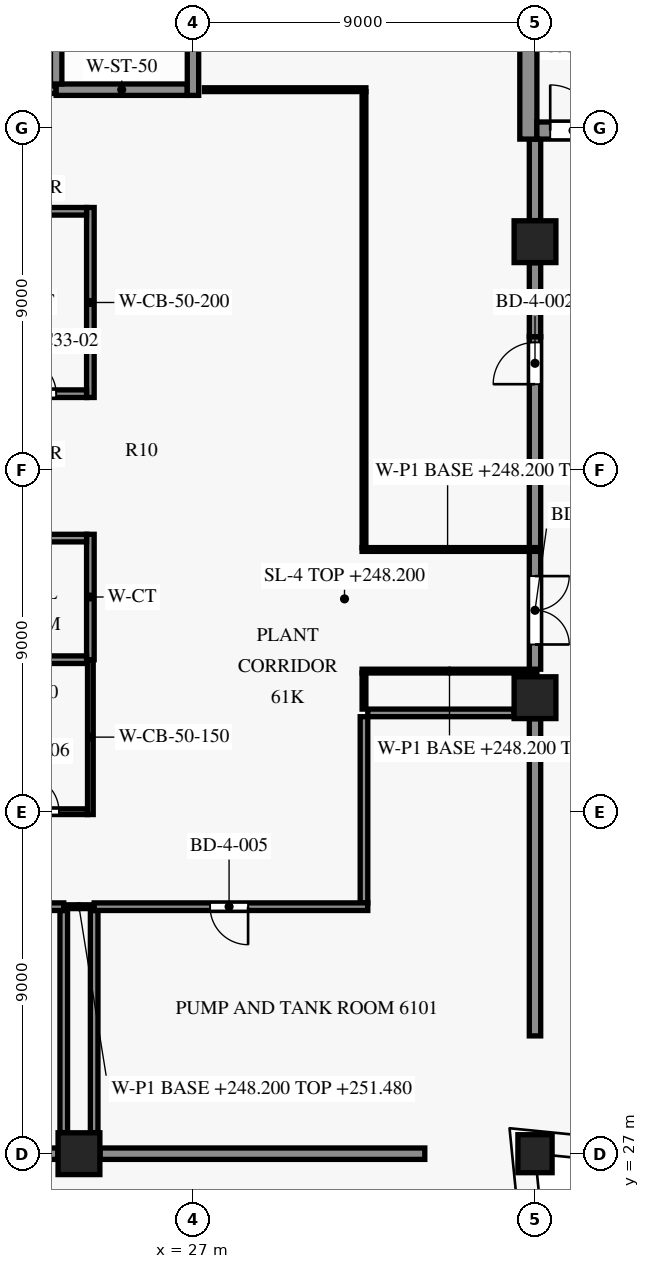
"""IFC4 building model, lengths in metres.
Left out: names, types, materials, properties, quantities, classifications, styles, units other than length and angle.
Written with IfcOpenShell. Run it as: python <this file> out.ifc"""

import sys

from ifc_helpers import new_model, si_unit, direction, frame, frame_2d, origin, origin_2d, place, context, subcontext, project, spatial, rectangle, extrude, element, fill, save


model = new_model("IFC4")
c1 = context("Model", 3, precision=1e-05, world=origin(), true_north=direction((0.0, 1.0)))
c2 = subcontext(c1, "Body", "Model", "MODEL_VIEW")
j1 = project(units=[si_unit("LENGTHUNIT", "METRE"), si_unit("PLANEANGLEUNIT", "RADIAN")], contexts=[c1])
p1 = place(None, origin())
s1 = spatial("IfcSite", under=j1, at=p1, CompositionType="ELEMENT")
p2 = place(p1, origin())
s2 = spatial("IfcBuilding", under=s1, at=p2, CompositionType="ELEMENT")
p3 = place(p2, frame((0.0, 0.0, 248.2)))
s3 = spatial("IfcBuildingStorey", under=s2, at=p3, CompositionType="ELEMENT", Elevation=248.2)
p4 = place(p3, frame((36.0, 27.0, 0.0), z_axis=(0.0, 0.0, 1.0), x_axis=(-0.0995038382, 0.995037178292, 0.0)))
e1 = element("IfcColumn", 1, at=p4, inside=s3, PredefinedType="COLUMN", context=c2, shape_type="SweptSolid", body=[
    extrude(rectangle(XDim=0.9, YDim=1.0, at=origin_2d()), origin(), (0.0, 0.0, 1.0), 4.2),
])
for number, where, z_axis, x_axis in (
    (2, (24.0, 27.0, 0.0), (0.0, 0.0, 1.0), (1.0, 0.0, 0.0)),
    (3, (36.0, 39.0, 0.0), (0.0, 0.0, 1.0), (1.0, 0.0, 0.0)),
    (4, (36.0, 51.0, 0.0), (0.0, 0.0, 1.0), (1.0, 0.0, 0.0)),
):
    element("IfcColumn", number, at=place(p3, frame(where, z_axis=z_axis, x_axis=x_axis)), inside=s3, PredefinedType="COLUMN", context=c2, shape_type="SweptSolid", body=[
        extrude(rectangle(XDim=1.1, YDim=1.1, at=origin_2d()), origin(), (0.0, 0.0, 1.0), 4.2),
    ])
p5 = place(p3, frame((12.4, 36.0, 0.0), z_axis=(0.0, 0.0, 1.0), x_axis=(1.0, 0.0, 0.0)))
e5 = element("IfcWall", 5, at=p5, inside=s3, PredefinedType="SHEAR", context=c2, shape_type="SweptSolid", body=[
    extrude(rectangle(XDim=11.825, YDim=0.15, at=frame_2d((5.913, 0.0))), origin(), (0.0, 0.0, 1.0), 3.9),
])
p6 = place(p5, frame((1.05, 0.0, 0.0)))
e6 = element("IfcOpeningElement", 6, at=p6, cuts=e5, PredefinedType="OPENING", context=c2, shape_type="SweptSolid", body=[
    extrude(rectangle(XDim=0.9, YDim=2.1, at=frame_2d((0.45, 1.05))), frame((0.0, 0.085, 0.0), z_axis=(0.0, -1.0, 0.0), x_axis=(1.0, 0.0, 0.0)), (0.0, 0.0, 1.0), 0.17),
])
p7 = place(p5, frame((4.15, 0.0, 0.0)))
e7 = element("IfcOpeningElement", 7, at=p7, cuts=e5, PredefinedType="OPENING", context=c2, shape_type="SweptSolid", body=[
    extrude(rectangle(XDim=1.0, YDim=2.1, at=frame_2d((0.5, 1.05))), frame((0.0, 0.085, 0.0), z_axis=(0.0, -1.0, 0.0), x_axis=(1.0, 0.0, 0.0)), (0.0, 0.0, 1.0), 0.17),
])
p8 = place(p5, frame((7.35, 0.0, 0.0)))
e8 = element("IfcOpeningElement", 8, at=p8, cuts=e5, PredefinedType="OPENING", context=c2, shape_type="SweptSolid", body=[
    extrude(rectangle(XDim=0.9, YDim=2.1, at=frame_2d((0.45, 1.05))), frame((0.0, 0.085, 0.0), z_axis=(0.0, -1.0, 0.0), x_axis=(1.0, 0.0, 0.0)), (0.0, 0.0, 1.0), 0.17),
])
p9 = place(p5, frame((10.125, 0.0, 0.0)))
e9 = element("IfcOpeningElement", 9, at=p9, cuts=e5, PredefinedType="OPENING", context=c2, shape_type="SweptSolid", body=[
    extrude(rectangle(XDim=0.95, YDim=2.1, at=frame_2d((0.475, 1.05))), frame((0.0, 0.085, 0.0), z_axis=(0.0, -1.0, 0.0), x_axis=(1.0, 0.0, 0.0)), (0.0, 0.0, 1.0), 0.17),
])
p10 = place(p3, frame((8.1, 40.0, 0.0), z_axis=(0.0, 0.0, 1.0), x_axis=(1.0, 0.0, 0.0)))
e10 = element("IfcWall", 10, at=p10, inside=s3, PredefinedType="PARTITIONING", context=c2, shape_type="SweptSolid", body=[
    extrude(rectangle(XDim=16.1, YDim=0.2, at=frame_2d((8.05, 0.0))), origin(), (0.0, 0.0, 1.0), 3.9),
])
p11 = place(p3, frame((8.1, 43.2, 0.0), z_axis=(0.0, 0.0, 1.0), x_axis=(1.0, 0.0, 0.0)))
e11 = element("IfcWall", 11, at=p11, inside=s3, PredefinedType="PARTITIONING", context=c2, shape_type="SweptSolid", body=[
    extrude(rectangle(XDim=16.1, YDim=0.2, at=frame_2d((8.05, 0.0))), origin(), (0.0, 0.0, 1.0), 3.9),
])
p12 = place(p11, frame((1.575, 0.0, 0.0)))
e12 = element("IfcOpeningElement", 12, at=p12, cuts=e11, PredefinedType="OPENING", context=c2, shape_type="SweptSolid", body=[
    extrude(rectangle(XDim=0.9, YDim=2.1, at=frame_2d((0.45, 1.05))), frame((0.0, 0.11, 0.0), z_axis=(0.0, -1.0, 0.0), x_axis=(1.0, 0.0, 0.0)), (0.0, 0.0, 1.0), 0.22),
])
p13 = place(p11, frame((9.675, 0.0, 0.0)))
e13 = element("IfcOpeningElement", 13, at=p13, cuts=e11, PredefinedType="OPENING", context=c2, shape_type="SweptSolid", body=[
    extrude(rectangle(XDim=0.9, YDim=2.1, at=frame_2d((0.45, 1.05))), frame((0.0, 0.11, 0.0), z_axis=(0.0, -1.0, 0.0), x_axis=(1.0, 0.0, 0.0)), (0.0, 0.0, 1.0), 0.22),
])
p14 = place(p3, frame((21.6, 47.0, 0.0), z_axis=(0.0, 0.0, 1.0), x_axis=(1.0, 0.0, 0.0)))
e14 = element("IfcWall", 14, at=p14, inside=s3, PredefinedType="PARTITIONING", context=c2, shape_type="SweptSolid", body=[
    extrude(rectangle(XDim=2.6, YDim=0.2, at=frame_2d((1.3, 0.0))), origin(), (0.0, 0.0, 1.0), 3.9),
])
p15 = place(p14, frame((0.9, 0.0, 0.0)))
e15 = element("IfcOpeningElement", 15, at=p15, cuts=e14, PredefinedType="OPENING", context=c2, shape_type="SweptSolid", body=[
    extrude(rectangle(XDim=0.9, YDim=2.1, at=frame_2d((0.45, 1.05))), frame((0.0, 0.11, 0.0), z_axis=(0.0, -1.0, 0.0), x_axis=(1.0, 0.0, 0.0)), (0.0, 0.0, 1.0), 0.22),
])
p16 = place(p3, frame((21.6, 51.8, 0.0), z_axis=(0.0, 0.0, 1.0), x_axis=(1.0, 0.0, 0.0)))
e16 = element("IfcWall", 16, at=p16, inside=s3, PredefinedType="PARTITIONING", context=c2, shape_type="SweptSolid", body=[
    extrude(rectangle(XDim=2.6, YDim=0.2, at=frame_2d((1.3, 0.0))), origin(), (0.0, 0.0, 1.0), 3.9),
])
p17 = place(p3, frame((36.05, 53.925, 0.0), z_axis=(0.0, 0.0, 1.0), x_axis=(1.0, 0.0, 0.0)))
e17 = element("IfcWall", 17, at=p17, inside=s3, PredefinedType="SHEAR", context=c2, shape_type="SweptSolid", body=[
    extrude(rectangle(XDim=7.7, YDim=0.45, at=frame_2d((3.85, 0.0))), origin(), (0.0, 0.0, 1.0), 3.9),
])
p18 = place(p17, frame((0.35, 0.0, 0.0)))
e18 = element("IfcOpeningElement", 18, at=p18, cuts=e17, PredefinedType="OPENING", context=c2, shape_type="SweptSolid", body=[
    extrude(rectangle(XDim=1.2, YDim=2.2, at=frame_2d((0.6, 1.1))), frame((0.0, 0.235, 0.0), z_axis=(0.0, -1.0, 0.0), x_axis=(1.0, 0.0, 0.0)), (0.0, 0.0, 1.0), 0.47),
])
p19 = place(p3, frame((17.3, 55.0, 0.0), z_axis=(0.0, 0.0, 1.0), x_axis=(1.0, 0.0, 0.0)))
e19 = element("IfcWall", 19, at=p19, inside=s3, PredefinedType="PARTITIONING", context=c2, shape_type="SweptSolid", body=[
    extrude(rectangle(XDim=6.1, YDim=0.2, at=frame_2d((3.05, 0.0))), origin(), (0.0, 0.0, 1.0), 3.9),
])
p20 = place(p19, frame((2.55, 0.0, 0.0)))
e20 = element("IfcOpeningElement", 20, at=p20, cuts=e19, PredefinedType="OPENING", context=c2, shape_type="SweptSolid", body=[
    extrude(rectangle(XDim=1.0, YDim=2.1, at=frame_2d((0.5, 1.05))), frame((0.0, 0.11, 0.0), z_axis=(0.0, -1.0, 0.0), x_axis=(1.0, 0.0, 0.0)), (0.0, 0.0, 1.0), 0.22),
])
p21 = place(p3, frame((23.4, 55.0, 0.0), z_axis=(0.0, 0.0, 1.0), x_axis=(1.0, 0.0, 0.0)))
e21 = element("IfcWall", 21, at=p21, inside=s3, PredefinedType="SHEAR", context=c2, shape_type="SweptSolid", body=[
    extrude(rectangle(XDim=3.45, YDim=0.3, at=frame_2d((1.725, 0.0))), origin(), (0.0, 0.0, 1.0), 3.9),
])
p22 = place(p3, frame((23.4, 55.15, 0.0), z_axis=(0.0, 0.0, 1.0), x_axis=(0.0, 1.0, 0.0)))
e22 = element("IfcWall", 22, at=p22, inside=s3, PredefinedType="SHEAR", context=c2, shape_type="SweptSolid", body=[
    extrude(rectangle(XDim=8.0, YDim=0.3, at=frame_2d((4.0, 0.0))), origin(), (0.0, 0.0, 1.0), 3.9),
])
p23 = place(p3, frame((24.3, 35.925, 0.0), z_axis=(0.0, 0.0, 1.0), x_axis=(0.0, 1.0, 0.0)))
e23 = element("IfcWall", 23, at=p23, inside=s3, PredefinedType="SHEAR", context=c2, shape_type="SweptSolid", body=[
    extrude(rectangle(XDim=4.075, YDim=0.15, at=frame_2d((2.038, 0.0))), origin(), (0.0, 0.0, 1.0), 3.9),
])
p24 = place(p3, frame((24.3, 40.0, 0.0), z_axis=(0.0, 0.0, 1.0), x_axis=(0.0, 1.0, 0.0)))
e24 = element("IfcWall", 24, at=p24, inside=s3, PredefinedType="PARTITIONING", context=c2, shape_type="SweptSolid", body=[
    extrude(rectangle(XDim=3.3, YDim=0.2, at=frame_2d((1.65, 0.0))), origin(), (0.0, 0.0, 1.0), 3.9),
])
p25 = place(p3, frame((24.3, 46.9, 0.0), z_axis=(0.0, 0.0, 1.0), x_axis=(0.0, 1.0, 0.0)))
e25 = element("IfcWall", 25, at=p25, inside=s3, PredefinedType="SHEAR", context=c2, shape_type="SweptSolid", body=[
    extrude(rectangle(XDim=5.0, YDim=0.2, at=frame_2d((2.5, 0.0))), origin(), (0.0, 0.0, 1.0), 3.9),
])
p26 = place(p3, frame((27.0, 54.85, 0.0), z_axis=(0.0, 0.0, 1.0), x_axis=(0.0, 1.0, 0.0)))
e26 = element("IfcWall", 26, at=p26, inside=s3, PredefinedType="SHEAR", context=c2, shape_type="SweptSolid", body=[
    extrude(rectangle(XDim=8.55, YDim=0.3, at=frame_2d((4.275, 0.0))), origin(), (0.0, 0.0, 1.0), 3.9),
])
p27 = place(p26, frame((6.55, 0.0, 0.0)))
e27 = element("IfcOpeningElement", 27, at=p27, cuts=e26, PredefinedType="OPENING", context=c2, shape_type="SweptSolid", body=[
    extrude(rectangle(XDim=1.2, YDim=2.2, at=frame_2d((0.6, 1.1))), frame((0.0, 0.16, 0.0), z_axis=(0.0, -1.0, 0.0), x_axis=(1.0, 0.0, 0.0)), (0.0, 0.0, 1.0), 0.32),
])
p28 = place(p3, frame((35.825, 53.7, 0.0), z_axis=(0.0, 0.0, 1.0), x_axis=(0.0, 1.0, 0.0)))
e28 = element("IfcWall", 28, at=p28, inside=s3, PredefinedType="SHEAR", context=c2, shape_type="SweptSolid", body=[
    extrude(rectangle(XDim=4.2, YDim=0.45, at=frame_2d((2.1, 0.0))), origin(), (0.0, 0.0, 1.0), 3.9),
])
p29 = place(p3, frame((23.445, 27.0, 0.0), z_axis=(0.0, 0.0, 1.0), x_axis=(-1.0, 0.0, 0.0)))
e29 = element("IfcWall", 29, at=p29, inside=s3, PredefinedType="PARTITIONING", context=c2, shape_type="SweptSolid", body=[
    extrude(rectangle(XDim=3.045, YDim=0.3, at=frame_2d((1.522, 0.0))), origin(), (0.0, 0.0, 1.0), 3.28),
])
p30 = place(p3, frame((33.1, 27.0, 0.0), z_axis=(0.0, 0.0, 1.0), x_axis=(-1.0, 0.0, 0.0)))
e30 = element("IfcWall", 30, at=p30, inside=s3, PredefinedType="PARTITIONING", context=c2, shape_type="SweptSolid", body=[
    extrude(rectangle(XDim=8.545, YDim=0.3, at=frame_2d((4.272, 0.0))), origin(), (0.0, 0.0, 1.0), 3.28),
])
for number, where, z_axis, x_axis in (
    (31, (24.4, 27.555, 0.0), (0.0, 0.0, 1.0), (0.0, 1.0, 0.0)),
    (32, (23.6, 33.4, 0.0), (0.0, 0.0, 1.0), (0.0, -1.0, 0.0)),
):
    element("IfcWall", number, at=place(p3, frame(where, z_axis=z_axis, x_axis=x_axis)), inside=s3, PredefinedType="PARTITIONING", context=c2, shape_type="SweptSolid", body=[
        extrude(rectangle(XDim=5.845, YDim=0.2, at=frame_2d((2.922, 0.0))), origin(), (0.0, 0.0, 1.0), 3.88),
    ])
p31 = place(p3, frame((23.6, 33.5, 0.0), z_axis=(0.0, 0.0, 1.0), x_axis=(-1.0, 0.0, 0.0)))
e33 = element("IfcWall", 33, at=p31, inside=s3, PredefinedType="PARTITIONING", context=c2, shape_type="SweptSolid", body=[
    extrude(rectangle(XDim=3.3, YDim=0.2, at=frame_2d((1.65, 0.0))), origin(), (0.0, 0.0, 1.0), 3.88),
])
p32 = place(p3, frame((24.4, 33.5, 0.0), z_axis=(0.0, 0.0, 1.0), x_axis=(-1.0, 0.0, 0.0)))
e34 = element("IfcWall", 34, at=p32, inside=s3, PredefinedType="PARTITIONING", context=c2, shape_type="SweptSolid", body=[
    extrude(rectangle(XDim=0.8, YDim=0.1, at=frame_2d((0.4, 0.0))), origin(), (0.0, 0.0, 1.0), 3.28),
])
p33 = place(p3, frame((31.6, 33.5, 0.0), z_axis=(0.0, 0.0, 1.0), x_axis=(-1.0, 0.0, 0.0)))
e35 = element("IfcWall", 35, at=p33, inside=s3, PredefinedType="PARTITIONING", context=c2, shape_type="SweptSolid", body=[
    extrude(rectangle(XDim=7.2, YDim=0.2, at=frame_2d((3.6, 0.0))), origin(), (0.0, 0.0, 1.0), 3.88),
])
p34 = place(p33, frame((3.15, 0.0, 0.0)))
e36 = element("IfcOpeningElement", 36, at=p34, cuts=e35, PredefinedType="OPENING", context=c2, shape_type="SweptSolid", body=[
    extrude(rectangle(XDim=1.0, YDim=2.1, at=frame_2d((0.5, 1.05))), frame((0.0, 0.11, 0.0), z_axis=(0.0, -1.0, 0.0), x_axis=(1.0, 0.0, 0.0)), (0.0, 0.0, 1.0), 0.22),
])
p35 = place(p3, frame((36.0, 38.445, 0.0), z_axis=(0.0, 0.0, 1.0), x_axis=(0.0, -1.0, 0.0)))
e37 = element("IfcWall", 37, at=p35, inside=s3, PredefinedType="PARTITIONING", context=c2, shape_type="SweptSolid", body=[
    extrude(rectangle(XDim=8.345, YDim=0.3, at=frame_2d((4.172, 0.0))), origin(), (0.0, 0.0, 1.0), 3.28),
])
p36 = place(p3, frame((31.5, 38.5, 0.0), z_axis=(0.0, 0.0, 1.0), x_axis=(0.0, -1.0, 0.0)))
e38 = element("IfcWall", 38, at=p36, inside=s3, PredefinedType="PARTITIONING", context=c2, shape_type="SweptSolid", body=[
    extrude(rectangle(XDim=4.9, YDim=0.2, at=frame_2d((2.45, 0.0))), origin(), (0.0, 0.0, 1.0), 3.88),
])
p37 = place(p3, frame((31.6, 38.6, 0.0), z_axis=(0.0, 0.0, 1.0), x_axis=(1.0, 0.0, 0.0)))
e39 = element("IfcWall", 39, at=p37, inside=s3, PredefinedType="PARTITIONING", context=c2, shape_type="SweptSolid", body=[
    extrude(rectangle(XDim=3.845, YDim=0.2, at=frame_2d((1.922, 0.0))), origin(), (0.0, 0.0, 1.0), 3.88),
])
p38 = place(p3, frame((31.5, 39.65, 0.0), z_axis=(0.0, 0.0, 1.0), x_axis=(0.0, -1.0, 0.0)))
e40 = element("IfcWall", 40, at=p38, inside=s3, PredefinedType="PARTITIONING", context=c2, shape_type="SweptSolid", body=[
    extrude(rectangle(XDim=0.95, YDim=0.1, at=frame_2d((0.475, 0.0))), origin(), (0.0, 0.0, 1.0), 3.88),
])
p39 = place(p3, frame((36.05, 39.7, 0.0), z_axis=(0.0, 0.0, 1.0), x_axis=(-1.0, 0.0, 0.0)))
e41 = element("IfcWall", 41, at=p39, inside=s3, PredefinedType="PARTITIONING", context=c2, shape_type="SweptSolid", body=[
    extrude(rectangle(XDim=4.6, YDim=0.1, at=frame_2d((2.3, 0.0))), origin(), (0.0, 0.0, 1.0), 3.28),
])
p40 = place(p3, frame((36.0, 42.85, 0.0), z_axis=(0.0, 0.0, 1.0), x_axis=(0.0, -1.0, 0.0)))
e42 = element("IfcWall", 42, at=p40, inside=s3, PredefinedType="PARTITIONING", context=c2, shape_type="SweptSolid", body=[
    extrude(rectangle(XDim=3.1, YDim=0.3, at=frame_2d((1.55, 0.0))), origin(), (0.0, 0.0, 1.0), 3.28),
])
p41 = place(p40, frame((0.65, 0.0, 0.0)))
e43 = element("IfcOpeningElement", 43, at=p41, cuts=e42, PredefinedType="OPENING", context=c2, shape_type="SweptSolid", body=[
    extrude(rectangle(XDim=1.8, YDim=2.1, at=frame_2d((0.9, 1.05))), frame((0.0, 0.16, 0.0), z_axis=(0.0, -1.0, 0.0), x_axis=(1.0, 0.0, 0.0)), (0.0, 0.0, 1.0), 0.32),
])
p42 = place(p3, frame((31.45, 42.9, 0.0), z_axis=(0.0, 0.0, 1.0), x_axis=(1.0, 0.0, 0.0)))
e44 = element("IfcWall", 44, at=p42, inside=s3, PredefinedType="PARTITIONING", context=c2, shape_type="SweptSolid", body=[
    extrude(rectangle(XDim=4.5, YDim=0.1, at=frame_2d((2.25, 0.0))), origin(), (0.0, 0.0, 1.0), 3.28),
])
p43 = place(p3, frame((36.0, 42.95, 0.0), z_axis=(0.0, 0.0, 1.0), x_axis=(0.0, 1.0, 0.0)))
e45 = element("IfcWall", 45, at=p43, inside=s3, PredefinedType="PARTITIONING", context=c2, shape_type="SweptSolid", body=[
    extrude(rectangle(XDim=5.55, YDim=0.3, at=frame_2d((2.775, 0.0))), origin(), (0.0, 0.0, 1.0), 3.28),
])
p44 = place(p43, frame((4.3, 0.0, 0.0)))
e46 = element("IfcOpeningElement", 46, at=p44, cuts=e45, PredefinedType="OPENING", context=c2, shape_type="SweptSolid", body=[
    extrude(rectangle(XDim=1.1, YDim=2.1, at=frame_2d((0.55, 1.05))), frame((0.0, 0.16, 0.0), z_axis=(0.0, -1.0, 0.0), x_axis=(1.0, 0.0, 0.0)), (0.0, 0.0, 1.0), 0.32),
])
p45 = place(p3, frame((36.0, 48.5, 0.0), z_axis=(0.0, 0.0, 1.0), x_axis=(0.0, 1.0, 0.0)))
e47 = element("IfcWall", 47, at=p45, inside=s3, PredefinedType="PARTITIONING", context=c2, shape_type="SweptSolid", body=[
    extrude(rectangle(XDim=1.945, YDim=0.3, at=frame_2d((0.973, 0.0))), origin(), (0.0, 0.0, 1.0), 3.28),
])
p46 = place(p3, frame((36.0, 51.555, 0.0), z_axis=(0.0, 0.0, 1.0), x_axis=(0.0, 1.0, 0.0)))
e48 = element("IfcWall", 48, at=p46, inside=s3, PredefinedType="PARTITIONING", context=c2, shape_type="SweptSolid", body=[
    extrude(rectangle(XDim=2.145, YDim=0.3, at=frame_2d((1.073, 0.0))), origin(), (0.0, 0.0, 1.0), 3.28),
])
p47 = place(p3, frame((31.5, 54.95, 0.0), z_axis=(0.0, 0.0, 1.0), x_axis=(0.0, -1.0, 0.0)))
e49 = element("IfcWall", 49, at=p47, inside=s3, PredefinedType="PARTITIONING", context=c2, shape_type="SweptSolid", body=[
    extrude(rectangle(XDim=12.0, YDim=0.1, at=frame_2d((6.0, 0.0))), origin(), (0.0, 0.0, 1.0), 3.88),
])
p48 = place(p3, frame((27.3, 55.0, 0.0), z_axis=(0.0, 0.0, 1.0), x_axis=(1.0, 0.0, 0.0)))
e50 = element("IfcWall", 50, at=p48, inside=s3, PredefinedType="PARTITIONING", context=c2, shape_type="SweptSolid", body=[
    extrude(rectangle(XDim=4.25, YDim=0.1, at=frame_2d((2.125, 0.0))), origin(), (0.0, 0.0, 1.0), 3.88),
])
p49 = place(p15, origin())
e51 = element("IfcDoor", 51, at=p49, inside=s3, OperationType="SINGLE_SWING_LEFT", PredefinedType="DOOR", context=c2, shape_type="SweptSolid", body=[
    extrude(rectangle(XDim=0.9, YDim=2.1, at=frame_2d((0.45, 1.05))), frame((0.0, 0.025, 0.0), z_axis=(0.0, -1.0, 0.0), x_axis=(1.0, 0.0, 0.0)), (0.0, 0.0, 1.0), 0.05),
])
fill(e15, e51)
p50 = place(p9, origin())
e52 = element("IfcDoor", 52, at=p50, inside=s3, OperationType="SINGLE_SWING_LEFT", PredefinedType="DOOR", context=c2, shape_type="SweptSolid", body=[
    extrude(rectangle(XDim=0.95, YDim=2.1, at=frame_2d((0.475, 1.05))), frame((0.0, 0.025, 0.0), z_axis=(0.0, -1.0, 0.0), x_axis=(1.0, 0.0, 0.0)), (0.0, 0.0, 1.0), 0.05),
])
fill(e9, e52)
p51 = place(p18, origin())
e53 = element("IfcDoor", 53, at=p51, inside=s3, OperationType="SINGLE_SWING_LEFT", PredefinedType="DOOR", context=c2, shape_type="SweptSolid", body=[
    extrude(rectangle(XDim=1.2, YDim=2.2, at=frame_2d((0.6, 1.1))), frame((0.0, 0.025, 0.0), z_axis=(0.0, -1.0, 0.0), x_axis=(1.0, 0.0, 0.0)), (0.0, 0.0, 1.0), 0.05),
])
fill(e18, e53)
p52 = place(p44, origin())
e54 = element("IfcDoor", 54, at=p52, inside=s3, OperationType="SINGLE_SWING_RIGHT", PredefinedType="DOOR", context=c2, shape_type="SweptSolid", body=[
    extrude(rectangle(XDim=1.1, YDim=2.1, at=frame_2d((0.55, 1.05))), frame((0.0, 0.025, 0.0), z_axis=(0.0, -1.0, 0.0), x_axis=(1.0, 0.0, 0.0)), (0.0, 0.0, 1.0), 0.05),
])
fill(e46, e54)
p53 = place(p34, origin())
e55 = element("IfcDoor", 55, at=p53, inside=s3, OperationType="SINGLE_SWING_RIGHT", PredefinedType="DOOR", context=c2, shape_type="SweptSolid", body=[
    extrude(rectangle(XDim=1.0, YDim=2.1, at=frame_2d((0.5, 1.05))), frame((0.0, 0.025, 0.0), z_axis=(0.0, -1.0, 0.0), x_axis=(1.0, 0.0, 0.0)), (0.0, 0.0, 1.0), 0.05),
])
fill(e36, e55)
p54 = place(p41, origin())
e56 = element("IfcDoor", 56, at=p54, inside=s3, OperationType="DOUBLE_DOOR_SINGLE_SWING", PredefinedType="DOOR", context=c2, shape_type="SweptSolid", body=[
    extrude(rectangle(XDim=1.8, YDim=2.1, at=frame_2d((0.9, 1.05))), frame((0.0, 0.025, 0.0), z_axis=(0.0, -1.0, 0.0), x_axis=(1.0, 0.0, 0.0)), (0.0, 0.0, 1.0), 0.05),
])
fill(e43, e56)
save(model, sys.argv[1])
